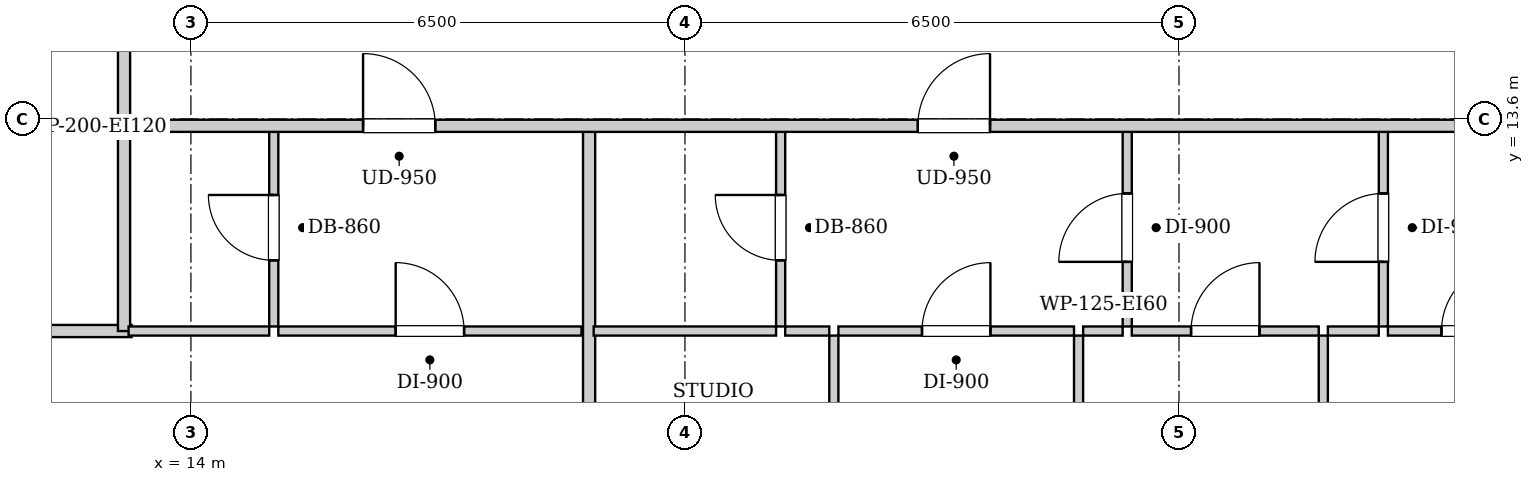
"""IFC4 building model, lengths in metres.
Left out: names, types, materials, properties, quantities, classifications, styles, units other than length and angle.
Written with IfcOpenShell. Run it as: python <this file> out.ifc"""

import sys

from ifc_helpers import new_model, si_unit, direction, frame, frame_2d, origin, place, context, subcontext, project, spatial, rectangle, extrude, element, fill, save


model = new_model("IFC4")
c1 = context("Model", 3, precision=1e-05, world=origin(), true_north=direction((0.0, 1.0)))
c2 = subcontext(c1, "Body", "Model", "MODEL_VIEW")
j1 = project(units=[si_unit("LENGTHUNIT", "METRE"), si_unit("PLANEANGLEUNIT", "RADIAN")], contexts=[c1])
p1 = place(None, origin())
s1 = spatial("IfcSite", under=j1, at=p1, CompositionType="ELEMENT")
p2 = place(p1, origin())
s2 = spatial("IfcBuilding", under=s1, at=p2, CompositionType="ELEMENT")
p3 = place(p2, frame((0.0, 0.0, 197.5)))
s3 = spatial("IfcBuildingStorey", under=s2, at=p3, CompositionType="ELEMENT", Elevation=197.5)
p4 = place(p3, frame((13.12, 13.51, 0.0), z_axis=(0.0, 0.0, 1.0), x_axis=(0.0, 1.0, 0.0)))
e1 = element("IfcWall", 1, at=p4, inside=s3, PredefinedType="PARTITIONING", context=c2, shape_type="SweptSolid", body=[
    extrude(rectangle(XDim=1.58, YDim=0.16, at=frame_2d((0.79, 0.0))), origin(), (0.0, 0.0, 1.0), 3.04),
])
p5 = place(p3, frame((10.88, 10.81, 0.0), z_axis=(0.0, 0.0, 1.0), x_axis=(1.0, 0.0, 0.0)))
e2 = element("IfcWall", 2, at=p5, inside=s3, PredefinedType="PARTITIONING", context=c2, shape_type="SweptSolid", body=[
    extrude(rectangle(XDim=2.34, YDim=0.16, at=frame_2d((1.17, 0.0))), origin(), (0.0, 0.0, 1.0), 3.04),
])
p6 = place(p3, frame((13.12, 10.81, 0.0), z_axis=(0.0, 0.0, 1.0), x_axis=(0.0, 1.0, 0.0)))
e3 = element("IfcWall", 3, at=p6, inside=s3, PredefinedType="PARTITIONING", context=c2, shape_type="SweptSolid", body=[
    extrude(rectangle(XDim=2.66, YDim=0.16, at=frame_2d((1.33, 0.0))), origin(), (0.0, 0.0, 1.0), 3.04),
])
p7 = place(p3, frame((15.09, 10.87, 0.0), z_axis=(0.0, 0.0, 1.0), x_axis=(0.0, 1.0, 0.0)))
e4 = element("IfcWall", 4, at=p7, inside=s3, PredefinedType="PARTITIONING", context=c2, shape_type="SweptSolid", body=[
    extrude(rectangle(XDim=2.6, YDim=0.12, at=frame_2d((1.3, 0.0))), origin(), (0.0, 0.0, 1.0), 3.04),
])
p8 = place(p7, frame((0.87, 0.0, 0.0)))
e5 = element("IfcOpeningElement", 5, at=p8, cuts=e4, PredefinedType="OPENING", context=c2, shape_type="SweptSolid", body=[
    extrude(rectangle(XDim=0.86, YDim=2.05, at=frame_2d((0.43, 1.025))), frame((0.0, 0.07, 0.0), z_axis=(0.0, -1.0, 0.0), x_axis=(1.0, 0.0, 0.0)), (0.0, 0.0, 1.0), 0.14),
])
p9 = place(p3, frame((13.18, 10.81, 0.0), z_axis=(0.0, 0.0, 1.0), x_axis=(1.0, 0.0, 0.0)))
e6 = element("IfcWall", 6, at=p9, inside=s3, PredefinedType="PARTITIONING", context=c2, shape_type="SweptSolid", body=[
    extrude(rectangle(XDim=1.85, YDim=0.12, at=frame_2d((0.925, 0.0))), origin(), (0.0, 0.0, 1.0), 3.04),
])
p10 = place(p3, frame((15.15, 10.81, 0.0), z_axis=(0.0, 0.0, 1.0), x_axis=(1.0, 0.0, 0.0)))
e7 = element("IfcWall", 7, at=p10, inside=s3, PredefinedType="PARTITIONING", context=c2, shape_type="SweptSolid", body=[
    extrude(rectangle(XDim=3.989, YDim=0.12, at=frame_2d((1.995, 0.0))), origin(), (0.0, 0.0, 1.0), 3.04),
])
p11 = place(p10, frame((1.544, 0.0, 0.0)))
e8 = element("IfcOpeningElement", 8, at=p11, cuts=e7, PredefinedType="OPENING", context=c2, shape_type="SweptSolid", body=[
    extrude(rectangle(XDim=0.9, YDim=2.05, at=frame_2d((0.45, 1.025))), frame((0.0, 0.07, 0.0), z_axis=(0.0, -1.0, 0.0), x_axis=(1.0, 0.0, 0.0)), (0.0, 0.0, 1.0), 0.14),
])
p12 = place(p3, frame((19.239, 6.06, 0.0), z_axis=(0.0, 0.0, 1.0), x_axis=(0.0, 1.0, 0.0)))
e9 = element("IfcWall", 9, at=p12, inside=s3, PredefinedType="PARTITIONING", context=c2, shape_type="SweptSolid", body=[
    extrude(rectangle(XDim=7.41, YDim=0.16, at=frame_2d((3.705, 0.0))), origin(), (0.0, 0.0, 1.0), 3.04),
])
p13 = place(p3, frame((21.759, 10.87, 0.0), z_axis=(0.0, 0.0, 1.0), x_axis=(0.0, 1.0, 0.0)))
e10 = element("IfcWall", 10, at=p13, inside=s3, PredefinedType="PARTITIONING", context=c2, shape_type="SweptSolid", body=[
    extrude(rectangle(XDim=2.6, YDim=0.12, at=frame_2d((1.3, 0.0))), origin(), (0.0, 0.0, 1.0), 3.04),
])
p14 = place(p13, frame((0.87, 0.0, 0.0)))
e11 = element("IfcOpeningElement", 11, at=p14, cuts=e10, PredefinedType="OPENING", context=c2, shape_type="SweptSolid", body=[
    extrude(rectangle(XDim=0.86, YDim=2.05, at=frame_2d((0.43, 1.025))), frame((0.0, 0.07, 0.0), z_axis=(0.0, -1.0, 0.0), x_axis=(1.0, 0.0, 0.0)), (0.0, 0.0, 1.0), 0.14),
])
p15 = place(p3, frame((19.299, 10.81, 0.0), z_axis=(0.0, 0.0, 1.0), x_axis=(1.0, 0.0, 0.0)))
e12 = element("IfcWall", 12, at=p15, inside=s3, PredefinedType="PARTITIONING", context=c2, shape_type="SweptSolid", body=[
    extrude(rectangle(XDim=2.4, YDim=0.12, at=frame_2d((1.2, 0.0))), origin(), (0.0, 0.0, 1.0), 3.04),
])
p16 = place(p3, frame((26.319, 10.87, 0.0), z_axis=(0.0, 0.0, 1.0), x_axis=(0.0, 1.0, 0.0)))
e13 = element("IfcWall", 13, at=p16, inside=s3, PredefinedType="PARTITIONING", context=c2, shape_type="SweptSolid", body=[
    extrude(rectangle(XDim=2.6, YDim=0.12, at=frame_2d((1.3, 0.0))), origin(), (0.0, 0.0, 1.0), 3.04),
])
p17 = place(p16, frame((0.85, 0.0, 0.0)))
e14 = element("IfcOpeningElement", 14, at=p17, cuts=e13, PredefinedType="OPENING", context=c2, shape_type="SweptSolid", body=[
    extrude(rectangle(XDim=0.9, YDim=2.05, at=frame_2d((0.45, 1.025))), frame((0.0, 0.07, 0.0), z_axis=(0.0, -1.0, 0.0), x_axis=(1.0, 0.0, 0.0)), (0.0, 0.0, 1.0), 0.14),
])
p18 = place(p3, frame((21.819, 10.81, 0.0), z_axis=(0.0, 0.0, 1.0), x_axis=(1.0, 0.0, 0.0)))
e15 = element("IfcWall", 15, at=p18, inside=s3, PredefinedType="PARTITIONING", context=c2, shape_type="SweptSolid", body=[
    extrude(rectangle(XDim=0.58, YDim=0.12, at=frame_2d((0.29, 0.0))), origin(), (0.0, 0.0, 1.0), 3.04),
])
p19 = place(p3, frame((22.519, 10.81, 0.0), z_axis=(0.0, 0.0, 1.0), x_axis=(1.0, 0.0, 0.0)))
e16 = element("IfcWall", 16, at=p19, inside=s3, PredefinedType="PARTITIONING", context=c2, shape_type="SweptSolid", body=[
    extrude(rectangle(XDim=3.1, YDim=0.12, at=frame_2d((1.55, 0.0))), origin(), (0.0, 0.0, 1.0), 3.04),
])
p20 = place(p19, frame((1.1, 0.0, 0.0)))
e17 = element("IfcOpeningElement", 17, at=p20, cuts=e16, PredefinedType="OPENING", context=c2, shape_type="SweptSolid", body=[
    extrude(rectangle(XDim=0.9, YDim=2.05, at=frame_2d((0.45, 1.025))), frame((0.0, 0.07, 0.0), z_axis=(0.0, -1.0, 0.0), x_axis=(1.0, 0.0, 0.0)), (0.0, 0.0, 1.0), 0.14),
])
p21 = place(p3, frame((25.739, 10.81, 0.0), z_axis=(0.0, 0.0, 1.0), x_axis=(1.0, 0.0, 0.0)))
e18 = element("IfcWall", 18, at=p21, inside=s3, PredefinedType="PARTITIONING", context=c2, shape_type="SweptSolid", body=[
    extrude(rectangle(XDim=0.52, YDim=0.12, at=frame_2d((0.26, 0.0))), origin(), (0.0, 0.0, 1.0), 3.04),
])
p22 = place(p3, frame((29.689, 10.87, 0.0), z_axis=(0.0, 0.0, 1.0), x_axis=(0.0, 1.0, 0.0)))
e19 = element("IfcWall", 19, at=p22, inside=s3, PredefinedType="PARTITIONING", context=c2, shape_type="SweptSolid", body=[
    extrude(rectangle(XDim=2.6, YDim=0.12, at=frame_2d((1.3, 0.0))), origin(), (0.0, 0.0, 1.0), 3.04),
])
p23 = place(p22, frame((0.85, 0.0, 0.0)))
e20 = element("IfcOpeningElement", 20, at=p23, cuts=e19, PredefinedType="OPENING", context=c2, shape_type="SweptSolid", body=[
    extrude(rectangle(XDim=0.9, YDim=2.05, at=frame_2d((0.45, 1.025))), frame((0.0, 0.07, 0.0), z_axis=(0.0, -1.0, 0.0), x_axis=(1.0, 0.0, 0.0)), (0.0, 0.0, 1.0), 0.14),
])
p24 = place(p3, frame((26.379, 10.81, 0.0), z_axis=(0.0, 0.0, 1.0), x_axis=(1.0, 0.0, 0.0)))
e21 = element("IfcWall", 21, at=p24, inside=s3, PredefinedType="PARTITIONING", context=c2, shape_type="SweptSolid", body=[
    extrude(rectangle(XDim=2.46, YDim=0.12, at=frame_2d((1.23, 0.0))), origin(), (0.0, 0.0, 1.0), 3.04),
])
p25 = place(p24, frame((0.78, 0.0, 0.0)))
e22 = element("IfcOpeningElement", 22, at=p25, cuts=e21, PredefinedType="OPENING", context=c2, shape_type="SweptSolid", body=[
    extrude(rectangle(XDim=0.9, YDim=2.05, at=frame_2d((0.45, 1.025))), frame((0.0, 0.07, 0.0), z_axis=(0.0, -1.0, 0.0), x_axis=(1.0, 0.0, 0.0)), (0.0, 0.0, 1.0), 0.14),
])
p26 = place(p3, frame((28.959, 10.81, 0.0), z_axis=(0.0, 0.0, 1.0), x_axis=(1.0, 0.0, 0.0)))
e23 = element("IfcWall", 23, at=p26, inside=s3, PredefinedType="PARTITIONING", context=c2, shape_type="SweptSolid", body=[
    extrude(rectangle(XDim=0.67, YDim=0.12, at=frame_2d((0.335, 0.0))), origin(), (0.0, 0.0, 1.0), 3.04),
])
p27 = place(p3, frame((29.749, 10.81, 0.0), z_axis=(0.0, 0.0, 1.0), x_axis=(1.0, 0.0, 0.0)))
e24 = element("IfcWall", 24, at=p27, inside=s3, PredefinedType="PARTITIONING", context=c2, shape_type="SweptSolid", body=[
    extrude(rectangle(XDim=2.31, YDim=0.12, at=frame_2d((1.155, 0.0))), origin(), (0.0, 0.0, 1.0), 3.04),
])
p28 = place(p27, frame((0.705, 0.0, 0.0)))
e25 = element("IfcOpeningElement", 25, at=p28, cuts=e24, PredefinedType="OPENING", context=c2, shape_type="SweptSolid", body=[
    extrude(rectangle(XDim=0.9, YDim=2.05, at=frame_2d((0.45, 1.025))), frame((0.0, 0.07, 0.0), z_axis=(0.0, -1.0, 0.0), x_axis=(1.0, 0.0, 0.0)), (0.0, 0.0, 1.0), 0.14),
])
p29 = place(p3, frame((22.459, 4.08, 0.0), z_axis=(0.0, 0.0, 1.0), x_axis=(0.0, 1.0, 0.0)))
e26 = element("IfcWall", 26, at=p29, inside=s3, PredefinedType="PARTITIONING", context=c2, shape_type="SweptSolid", body=[
    extrude(rectangle(XDim=6.67, YDim=0.12, at=frame_2d((3.335, 0.0))), origin(), (0.0, 0.0, 1.0), 3.04),
])
p30 = place(p29, frame((2.87, 0.0, 0.0)))
e27 = element("IfcOpeningElement", 27, at=p30, cuts=e26, PredefinedType="OPENING", context=c2, shape_type="SweptSolid", body=[
    extrude(rectangle(XDim=0.9, YDim=2.05, at=frame_2d((0.45, 1.025))), frame((0.0, 0.07, 0.0), z_axis=(0.0, -1.0, 0.0), x_axis=(1.0, 0.0, 0.0)), (0.0, 0.0, 1.0), 0.14),
])
p31 = place(p3, frame((25.679, 4.08, 0.0), z_axis=(0.0, 0.0, 1.0), x_axis=(0.0, 1.0, 0.0)))
e28 = element("IfcWall", 28, at=p31, inside=s3, PredefinedType="PARTITIONING", context=c2, shape_type="SweptSolid", body=[
    extrude(rectangle(XDim=6.67, YDim=0.12, at=frame_2d((3.335, 0.0))), origin(), (0.0, 0.0, 1.0), 3.04),
])
p32 = place(p31, frame((2.87, 0.0, 0.0)))
e29 = element("IfcOpeningElement", 29, at=p32, cuts=e28, PredefinedType="OPENING", context=c2, shape_type="SweptSolid", body=[
    extrude(rectangle(XDim=0.9, YDim=2.05, at=frame_2d((0.45, 1.025))), frame((0.0, 0.07, 0.0), z_axis=(0.0, -1.0, 0.0), x_axis=(1.0, 0.0, 0.0)), (0.0, 0.0, 1.0), 0.14),
])
p33 = place(p3, frame((28.899, 4.08, 0.0), z_axis=(0.0, 0.0, 1.0), x_axis=(0.0, 1.0, 0.0)))
e30 = element("IfcWall", 30, at=p33, inside=s3, PredefinedType="PARTITIONING", context=c2, shape_type="SweptSolid", body=[
    extrude(rectangle(XDim=6.67, YDim=0.12, at=frame_2d((3.335, 0.0))), origin(), (0.0, 0.0, 1.0), 3.04),
])
p34 = place(p33, frame((2.87, 0.0, 0.0)))
e31 = element("IfcOpeningElement", 31, at=p34, cuts=e30, PredefinedType="OPENING", context=c2, shape_type="SweptSolid", body=[
    extrude(rectangle(XDim=0.9, YDim=2.05, at=frame_2d((0.45, 1.025))), frame((0.0, 0.07, 0.0), z_axis=(0.0, -1.0, 0.0), x_axis=(1.0, 0.0, 0.0)), (0.0, 0.0, 1.0), 0.14),
])
p35 = place(p3, frame((13.15, 13.51, 0.0), z_axis=(0.0, 0.0, 1.0), x_axis=(1.0, 0.0, 0.0)))
e32 = element("IfcWall", 32, at=p35, inside=s3, PredefinedType="PARTITIONING", context=c2, shape_type="SweptSolid", body=[
    extrude(rectangle(XDim=24.6, YDim=0.16, at=frame_2d((12.3, 0.0))), origin(), (0.0, 0.0, 1.0), 3.04),
])
p36 = place(p35, frame((3.115, 0.0, 0.0)))
e33 = element("IfcOpeningElement", 33, at=p36, cuts=e32, PredefinedType="OPENING", context=c2, shape_type="SweptSolid", body=[
    extrude(rectangle(XDim=0.95, YDim=2.1, at=frame_2d((0.475, 1.05))), frame((0.0, 0.09, 0.0), z_axis=(0.0, -1.0, 0.0), x_axis=(1.0, 0.0, 0.0)), (0.0, 0.0, 1.0), 0.18),
])
p37 = place(p35, frame((10.414, 0.0, 0.0)))
e34 = element("IfcOpeningElement", 34, at=p37, cuts=e32, PredefinedType="OPENING", context=c2, shape_type="SweptSolid", body=[
    extrude(rectangle(XDim=0.95, YDim=2.1, at=frame_2d((0.475, 1.05))), frame((0.0, 0.09, 0.0), z_axis=(0.0, -1.0, 0.0), x_axis=(1.0, 0.0, 0.0)), (0.0, 0.0, 1.0), 0.18),
])
p38 = place(p8, origin())
e35 = element("IfcDoor", 35, at=p38, inside=s3, OperationType="SINGLE_SWING_RIGHT", PredefinedType="DOOR", context=c2, shape_type="SweptSolid", body=[
    extrude(rectangle(XDim=0.86, YDim=2.05, at=frame_2d((0.43, 1.025))), frame((0.0, 0.025, 0.0), z_axis=(0.0, -1.0, 0.0), x_axis=(1.0, 0.0, 0.0)), (0.0, 0.0, 1.0), 0.05),
])
fill(e5, e35)
p39 = place(p11, origin())
e36 = element("IfcDoor", 36, at=p39, inside=s3, OperationType="SINGLE_SWING_LEFT", PredefinedType="DOOR", context=c2, shape_type="SweptSolid", body=[
    extrude(rectangle(XDim=0.9, YDim=2.05, at=frame_2d((0.45, 1.025))), frame((0.0, 0.025, 0.0), z_axis=(0.0, -1.0, 0.0), x_axis=(1.0, 0.0, 0.0)), (0.0, 0.0, 1.0), 0.05),
])
fill(e8, e36)
p40 = place(p14, origin())
e37 = element("IfcDoor", 37, at=p40, inside=s3, OperationType="SINGLE_SWING_RIGHT", PredefinedType="DOOR", context=c2, shape_type="SweptSolid", body=[
    extrude(rectangle(XDim=0.86, YDim=2.05, at=frame_2d((0.43, 1.025))), frame((0.0, 0.025, 0.0), z_axis=(0.0, -1.0, 0.0), x_axis=(1.0, 0.0, 0.0)), (0.0, 0.0, 1.0), 0.05),
])
fill(e11, e37)
p41 = place(p17, origin())
e38 = element("IfcDoor", 38, at=p41, inside=s3, OperationType="SINGLE_SWING_LEFT", PredefinedType="DOOR", context=c2, shape_type="SweptSolid", body=[
    extrude(rectangle(XDim=0.9, YDim=2.05, at=frame_2d((0.45, 1.025))), frame((0.0, 0.025, 0.0), z_axis=(0.0, -1.0, 0.0), x_axis=(1.0, 0.0, 0.0)), (0.0, 0.0, 1.0), 0.05),
])
fill(e14, e38)
p42 = place(p20, origin())
e39 = element("IfcDoor", 39, at=p42, inside=s3, OperationType="SINGLE_SWING_RIGHT", PredefinedType="DOOR", context=c2, shape_type="SweptSolid", body=[
    extrude(rectangle(XDim=0.9, YDim=2.05, at=frame_2d((0.45, 1.025))), frame((0.0, 0.025, 0.0), z_axis=(0.0, -1.0, 0.0), x_axis=(1.0, 0.0, 0.0)), (0.0, 0.0, 1.0), 0.05),
])
fill(e17, e39)
p43 = place(p23, origin())
e40 = element("IfcDoor", 40, at=p43, inside=s3, OperationType="SINGLE_SWING_LEFT", PredefinedType="DOOR", context=c2, shape_type="SweptSolid", body=[
    extrude(rectangle(XDim=0.9, YDim=2.05, at=frame_2d((0.45, 1.025))), frame((0.0, 0.025, 0.0), z_axis=(0.0, -1.0, 0.0), x_axis=(1.0, 0.0, 0.0)), (0.0, 0.0, 1.0), 0.05),
])
fill(e20, e40)
p44 = place(p25, origin())
e41 = element("IfcDoor", 41, at=p44, inside=s3, OperationType="SINGLE_SWING_RIGHT", PredefinedType="DOOR", context=c2, shape_type="SweptSolid", body=[
    extrude(rectangle(XDim=0.9, YDim=2.05, at=frame_2d((0.45, 1.025))), frame((0.0, 0.025, 0.0), z_axis=(0.0, -1.0, 0.0), x_axis=(1.0, 0.0, 0.0)), (0.0, 0.0, 1.0), 0.05),
])
fill(e22, e41)
p45 = place(p28, origin())
e42 = element("IfcDoor", 42, at=p45, inside=s3, OperationType="SINGLE_SWING_RIGHT", PredefinedType="DOOR", context=c2, shape_type="SweptSolid", body=[
    extrude(rectangle(XDim=0.9, YDim=2.05, at=frame_2d((0.45, 1.025))), frame((0.0, 0.025, 0.0), z_axis=(0.0, -1.0, 0.0), x_axis=(1.0, 0.0, 0.0)), (0.0, 0.0, 1.0), 0.05),
])
fill(e25, e42)
p46 = place(p36, origin())
e43 = element("IfcDoor", 43, at=p46, inside=s3, OperationType="SINGLE_SWING_LEFT", PredefinedType="DOOR", context=c2, shape_type="SweptSolid", body=[
    extrude(rectangle(XDim=0.95, YDim=2.1, at=frame_2d((0.475, 1.05))), frame((0.0, 0.025, 0.0), z_axis=(0.0, -1.0, 0.0), x_axis=(1.0, 0.0, 0.0)), (0.0, 0.0, 1.0), 0.05),
])
fill(e33, e43)
p47 = place(p37, origin())
e44 = element("IfcDoor", 44, at=p47, inside=s3, OperationType="SINGLE_SWING_RIGHT", PredefinedType="DOOR", context=c2, shape_type="SweptSolid", body=[
    extrude(rectangle(XDim=0.95, YDim=2.1, at=frame_2d((0.475, 1.05))), frame((0.0, 0.025, 0.0), z_axis=(0.0, -1.0, 0.0), x_axis=(1.0, 0.0, 0.0)), (0.0, 0.0, 1.0), 0.05),
])
fill(e34, e44)
save(model, sys.argv[1])
